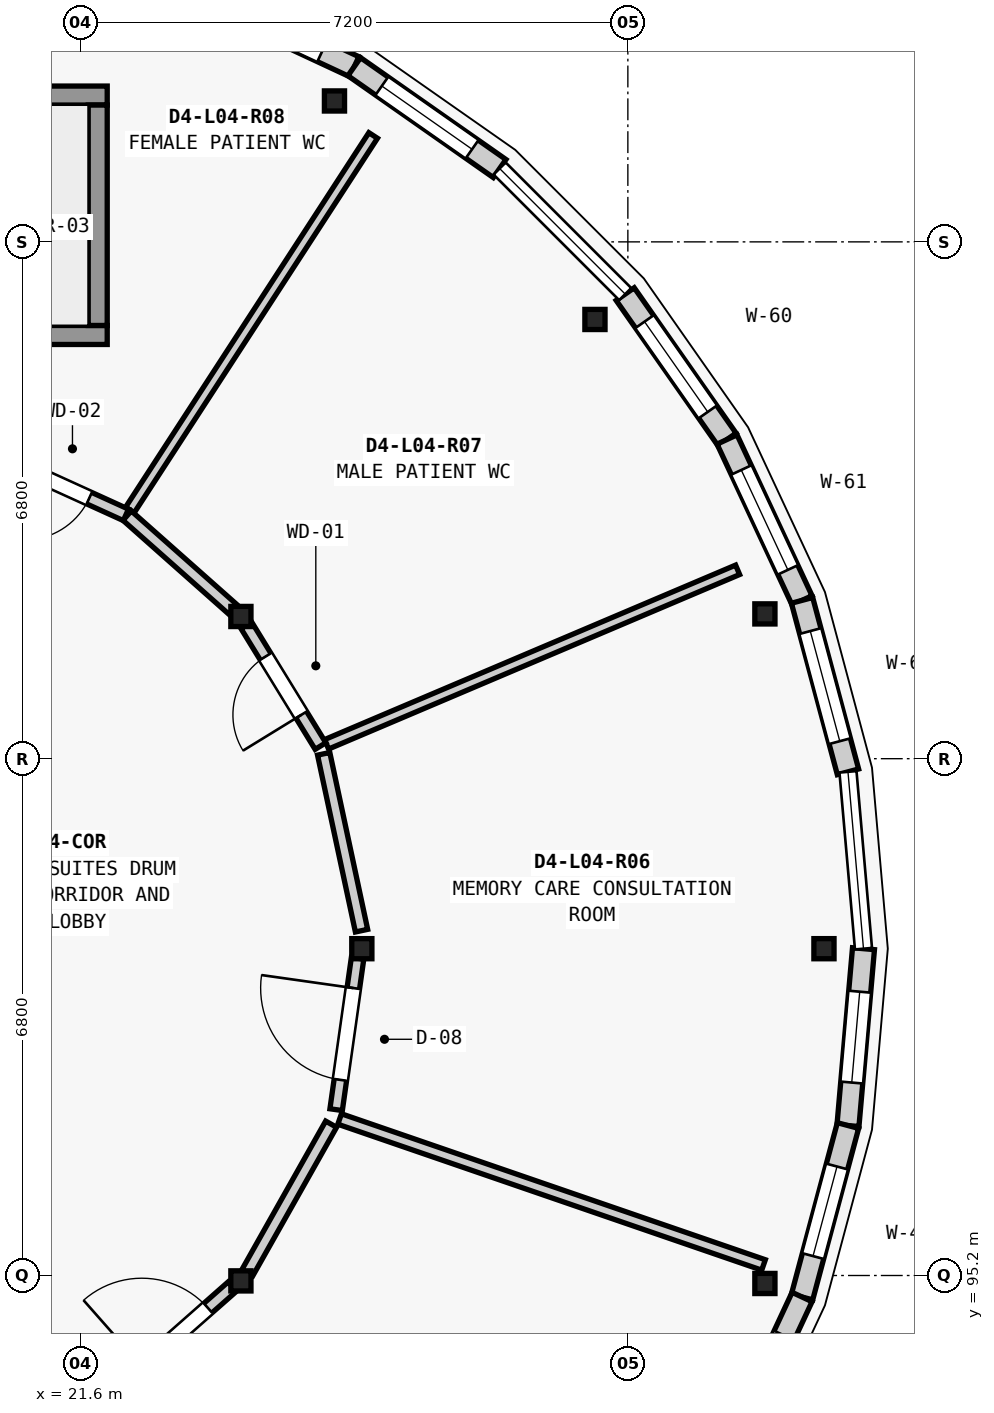
"""IFC4 building model, lengths in metres.
Left out: names, types, materials, properties, quantities, classifications, styles, units other than length and angle.
Written with IfcOpenShell. Run it as: python <this file> out.ifc"""

import sys

from ifc_helpers import new_model, si_unit, direction, frame, frame_2d, origin, origin_2d, place, context, subcontext, project, spatial, rectangle, extrude, element, fill, save


model = new_model("IFC4")
c1 = context("Model", 3, precision=1e-05, world=origin(), true_north=direction((0.0, 1.0)))
c2 = subcontext(c1, "Body", "Model", "MODEL_VIEW")
j1 = project(units=[si_unit("LENGTHUNIT", "METRE"), si_unit("PLANEANGLEUNIT", "RADIAN")], contexts=[c1])
p1 = place(None, origin())
s1 = spatial("IfcSite", under=j1, at=p1, CompositionType="ELEMENT")
p2 = place(p1, origin())
s2 = spatial("IfcBuilding", under=s1, at=p2, CompositionType="ELEMENT")
p3 = place(p2, frame((0.0, 0.0, 17.15)))
s3 = spatial("IfcBuildingStorey", under=s2, at=p3, CompositionType="ELEMENT", Elevation=17.15)
for number, where, z_axis, x_axis in (
    (1, (31.38, 99.5, 0.0), (0.0, 0.0, 1.0), (1.0, 0.0, 0.0)),
    (2, (30.603, 103.905, 0.0), (0.0, 0.0, 1.0), (1.0, 0.0, 0.0)),
    (3, (28.367, 107.779, 0.0), (0.0, 0.0, 1.0), (1.0, 0.0, 0.0)),
    (4, (24.94, 110.654, 0.0), (0.0, 0.0, 1.0), (1.0, 0.0, 0.0)),
    (5, (30.603, 95.095, 0.0), (0.0, 0.0, 1.0), (1.0, 0.0, 0.0)),
    (6, (25.3, 99.5, 0.0), (0.0, 0.0, 1.0), (1.0, 0.0, 0.0)),
    (7, (23.709, 103.871, 0.0), (0.0, 0.0, 1.0), (1.0, 0.0, 0.0)),
    (8, (23.709, 95.129, 0.0), (0.0, 0.0, 1.0), (1.0, 0.0, 0.0)),
):
    element("IfcColumn", number, at=place(p3, frame(where, z_axis=z_axis, x_axis=x_axis)), inside=s3, PredefinedType="COLUMN", context=c2, shape_type="SweptSolid", body=[
        extrude(rectangle(XDim=0.265, YDim=0.265, at=origin_2d()), origin(), (0.0, 0.0, 1.0), 4.2),
    ])
p4 = place(p3, frame((31.9, 99.5, 0.0), z_axis=(0.0, 0.0, 1.0), x_axis=(-0.087274565792, -0.996184295282, 0.0)))
e9 = element("IfcWall", 9, at=p4, inside=s3, PredefinedType="ELEMENTEDWALL", context=c2, shape_type="SweptSolid", body=[
    extrude(rectangle(XDim=2.336, YDim=0.29, at=frame_2d((1.168, 0.0))), origin(), (0.0, 0.0, 1.0), 3.369),
])
p5 = place(p4, frame((0.568, 0.0, 0.85)))
e10 = element("IfcOpeningElement", 10, at=p5, cuts=e9, PredefinedType="OPENING", context=c2, shape_type="SweptSolid", body=[
    extrude(rectangle(XDim=1.2, YDim=2.25, at=frame_2d((0.6, 1.125))), frame((0.0, 0.155, 0.0), z_axis=(0.0, -1.0, 0.0), x_axis=(1.0, 0.0, 0.0)), (0.0, 0.0, 1.0), 0.31),
])
p6 = place(p3, frame((31.696, 97.173, 0.0), z_axis=(0.0, 0.0, 1.0), x_axis=(-0.258612423585, -0.965981166673, 0.0)))
e11 = element("IfcWall", 11, at=p6, inside=s3, PredefinedType="ELEMENTEDWALL", context=c2, shape_type="SweptSolid", body=[
    extrude(rectangle(XDim=2.335, YDim=0.29, at=frame_2d((1.168, 0.0))), origin(), (0.0, 0.0, 1.0), 3.369),
])
p7 = place(p6, frame((0.558, 0.0, 0.85)))
e12 = element("IfcOpeningElement", 12, at=p7, cuts=e11, PredefinedType="OPENING", context=c2, shape_type="SweptSolid", body=[
    extrude(rectangle(XDim=1.22, YDim=1.5, at=frame_2d((0.61, 0.75))), frame((0.0, 0.155, 0.0), z_axis=(0.0, -1.0, 0.0), x_axis=(1.0, 0.0, 0.0)), (0.0, 0.0, 1.0), 0.31),
])
p8 = place(p3, frame((31.092, 94.917, 0.0), z_axis=(0.0, 0.0, 1.0), x_axis=(-0.422587894318, -0.906321946979, 0.0)))
e13 = element("IfcWall", 13, at=p8, inside=s3, PredefinedType="ELEMENTEDWALL", context=c2, shape_type="SweptSolid", body=[
    extrude(rectangle(XDim=2.336, YDim=0.29, at=frame_2d((1.168, 0.0))), origin(), (0.0, 0.0, 1.0), 3.369),
])
p9 = place(p8, frame((0.558, 0.0, 0.85)))
e14 = element("IfcOpeningElement", 14, at=p9, cuts=e13, PredefinedType="OPENING", context=c2, shape_type="SweptSolid", body=[
    extrude(rectangle(XDim=1.22, YDim=1.8, at=frame_2d((0.61, 0.9))), frame((0.0, 0.155, 0.0), z_axis=(0.0, -1.0, 0.0), x_axis=(1.0, 0.0, 0.0)), (0.0, 0.0, 1.0), 0.31),
])
p10 = place(p3, frame((23.083, 112.092, 0.0), z_axis=(0.0, 0.0, 1.0), x_axis=(0.906321946979, -0.422587894318, 0.0)))
e15 = element("IfcWall", 15, at=p10, inside=s3, PredefinedType="ELEMENTEDWALL", context=c2, shape_type="SweptSolid", body=[
    extrude(rectangle(XDim=2.336, YDim=0.29, at=frame_2d((1.168, 0.0))), origin(), (0.0, 0.0, 1.0), 3.369),
])
p11 = place(p10, frame((0.468, 0.0, 0.85)))
e16 = element("IfcOpeningElement", 16, at=p11, cuts=e15, PredefinedType="OPENING", context=c2, shape_type="SweptSolid", body=[
    extrude(rectangle(XDim=1.4, YDim=2.2, at=frame_2d((0.7, 1.1))), frame((0.0, 0.155, 0.0), z_axis=(0.0, -1.0, 0.0), x_axis=(1.0, 0.0, 0.0)), (0.0, 0.0, 1.0), 0.31),
])
p12 = place(p3, frame((25.2, 111.105, 0.0), z_axis=(0.0, 0.0, 1.0), x_axis=(0.819045278347, -0.573728883722, 0.0)))
e17 = element("IfcWall", 17, at=p12, inside=s3, PredefinedType="ELEMENTEDWALL", context=c2, shape_type="SweptSolid", body=[
    extrude(rectangle(XDim=2.336, YDim=0.29, at=frame_2d((1.168, 0.0))), origin(), (0.0, 0.0, 1.0), 3.369),
])
p13 = place(p12, frame((0.443, 0.0, 0.85)))
e18 = element("IfcOpeningElement", 18, at=p13, cuts=e17, PredefinedType="OPENING", context=c2, shape_type="SweptSolid", body=[
    extrude(rectangle(XDim=1.45, YDim=1.45, at=frame_2d((0.725, 0.725))), frame((0.0, 0.155, 0.0), z_axis=(0.0, -1.0, 0.0), x_axis=(1.0, 0.0, 0.0)), (0.0, 0.0, 1.0), 0.31),
])
p14 = place(p3, frame((28.765, 108.113, 0.0), z_axis=(0.0, 0.0, 1.0), x_axis=(0.573728883722, -0.819045278347, 0.0)))
e19 = element("IfcWall", 19, at=p14, inside=s3, PredefinedType="ELEMENTEDWALL", context=c2, shape_type="SweptSolid", body=[
    extrude(rectangle(XDim=2.336, YDim=0.29, at=frame_2d((1.168, 0.0))), origin(), (0.0, 0.0, 1.0), 3.369),
])
p15 = place(p14, frame((0.443, 0.0, 0.85)))
e20 = element("IfcOpeningElement", 20, at=p15, cuts=e19, PredefinedType="OPENING", context=c2, shape_type="SweptSolid", body=[
    extrude(rectangle(XDim=1.45, YDim=1.75, at=frame_2d((0.725, 0.875))), frame((0.0, 0.155, 0.0), z_axis=(0.0, -1.0, 0.0), x_axis=(1.0, 0.0, 0.0)), (0.0, 0.0, 1.0), 0.31),
])
p16 = place(p3, frame((30.105, 106.2, 0.0), z_axis=(0.0, 0.0, 1.0), x_axis=(0.422587894318, -0.906321946979, 0.0)))
e21 = element("IfcWall", 21, at=p16, inside=s3, PredefinedType="ELEMENTEDWALL", context=c2, shape_type="SweptSolid", body=[
    extrude(rectangle(XDim=2.336, YDim=0.29, at=frame_2d((1.168, 0.0))), origin(), (0.0, 0.0, 1.0), 3.369),
])
p17 = place(p16, frame((0.443, 0.0, 0.85)))
e22 = element("IfcOpeningElement", 22, at=p17, cuts=e21, PredefinedType="OPENING", context=c2, shape_type="SweptSolid", body=[
    extrude(rectangle(XDim=1.45, YDim=2.05, at=frame_2d((0.725, 1.025))), frame((0.0, 0.155, 0.0), z_axis=(0.0, -1.0, 0.0), x_axis=(1.0, 0.0, 0.0)), (0.0, 0.0, 1.0), 0.31),
])
p18 = place(p3, frame((31.092, 104.083, 0.0), z_axis=(0.0, 0.0, 1.0), x_axis=(0.258612423585, -0.965981166673, 0.0)))
e23 = element("IfcWall", 23, at=p18, inside=s3, PredefinedType="ELEMENTEDWALL", context=c2, shape_type="SweptSolid", body=[
    extrude(rectangle(XDim=2.335, YDim=0.29, at=frame_2d((1.168, 0.0))), origin(), (0.0, 0.0, 1.0), 3.369),
])
p19 = place(p18, frame((0.418, 0.0, 0.85)))
e24 = element("IfcOpeningElement", 24, at=p19, cuts=e23, PredefinedType="OPENING", context=c2, shape_type="SweptSolid", body=[
    extrude(rectangle(XDim=1.5, YDim=1.3, at=frame_2d((0.75, 0.65))), frame((0.0, 0.155, 0.0), z_axis=(0.0, -1.0, 0.0), x_axis=(1.0, 0.0, 0.0)), (0.0, 0.0, 1.0), 0.31),
])
p20 = place(p3, frame((15.05, 107.575, 0.0), z_axis=(0.0, 0.0, 1.0), x_axis=(1.0, 0.0, 0.0)))
e25 = element("IfcWall", 25, at=p20, inside=s3, PredefinedType="SHEAR", context=c2, shape_type="SweptSolid", body=[
    extrude(rectangle(XDim=6.9, YDim=0.25, at=frame_2d((3.45, 0.0))), origin(), (0.0, 0.0, 1.0), 4.015),
])
p21 = place(p20, frame((0.43, 0.0, 0.0)))
e26 = element("IfcOpeningElement", 26, at=p21, cuts=e25, PredefinedType="OPENING", context=c2, shape_type="SweptSolid", body=[
    extrude(rectangle(XDim=1.1, YDim=2.15, at=frame_2d((0.55, 1.075))), frame((0.0, 0.135, 0.0), z_axis=(0.0, -1.0, 0.0), x_axis=(1.0, 0.0, 0.0)), (0.0, 0.0, 1.0), 0.27),
])
p22 = place(p3, frame((15.05, 110.725, 0.0), z_axis=(0.0, 0.0, 1.0), x_axis=(1.0, 0.0, 0.0)))
e27 = element("IfcWall", 27, at=p22, inside=s3, PredefinedType="SHEAR", context=c2, shape_type="SweptSolid", body=[
    extrude(rectangle(XDim=6.9, YDim=0.25, at=frame_2d((3.45, 0.0))), origin(), (0.0, 0.0, 1.0), 4.015),
])
p23 = place(p3, frame((21.825, 107.7, 0.0), z_axis=(0.0, 0.0, 1.0), x_axis=(0.0, 1.0, 0.0)))
e28 = element("IfcWall", 28, at=p23, inside=s3, PredefinedType="SHEAR", context=c2, shape_type="SweptSolid", body=[
    extrude(rectangle(XDim=2.9, YDim=0.25, at=frame_2d((1.45, 0.0))), origin(), (0.0, 0.0, 1.0), 4.015),
])
p24 = place(p3, frame((25.008, 97.259, 0.0), z_axis=(0.0, 0.0, 1.0), x_axis=(0.945537377012, -0.325513546068, 0.0)))
e29 = element("IfcWall", 29, at=p24, inside=s3, PredefinedType="PARTITIONING", context=c2, shape_type="SweptSolid", body=[
    extrude(rectangle(XDim=5.898, YDim=0.145, at=frame_2d((2.949, 0.0))), origin(), (0.0, 0.0, 1.0), 3.344),
])
p25 = place(p3, frame((24.836, 102.189, 0.0), z_axis=(0.0, 0.0, 1.0), x_axis=(0.920468107404, 0.390817685438, 0.0)))
e30 = element("IfcWall", 30, at=p25, inside=s3, PredefinedType="PLUMBINGWALL", context=c2, shape_type="SweptSolid", body=[
    extrude(rectangle(XDim=5.875, YDim=0.135, at=frame_2d((2.938, 0.0))), origin(), (0.0, 0.0, 1.0), 3.344),
])
p26 = place(p3, frame((22.249, 105.273, 0.0), z_axis=(0.0, 0.0, 1.0), x_axis=(0.544677189284, 0.838645789039, 0.0)))
e31 = element("IfcWall", 31, at=p26, inside=s3, PredefinedType="PLUMBINGWALL", context=c2, shape_type="SweptSolid", body=[
    extrude(rectangle(XDim=5.875, YDim=0.135, at=frame_2d((2.938, 0.0))), origin(), (0.0, 0.0, 1.0), 3.344),
])
p27 = place(p3, frame((22.088, 93.724, 0.0), z_axis=(0.0, 0.0, 1.0), x_axis=(0.750064751016, 0.66136439977, 0.0)))
e32 = element("IfcWall", 32, at=p27, inside=s3, PredefinedType="PARTITIONING", context=c2, shape_type="SweptSolid", body=[
    extrude(rectangle(XDim=2.009, YDim=0.165, at=frame_2d((1.005, 0.0))), origin(), (0.0, 0.0, 1.0), 3.344),
])
p28 = place(p27, frame((0.424, 0.0, 0.0)))
e33 = element("IfcOpeningElement", 33, at=p28, cuts=e32, PredefinedType="OPENING", context=c2, shape_type="SweptSolid", body=[
    extrude(rectangle(XDim=1.16, YDim=2.18, at=frame_2d((0.58, 1.09))), frame((0.0, 0.093, 0.0), z_axis=(0.0, -1.0, 0.0), x_axis=(1.0, 0.0, 0.0)), (0.0, 0.0, 1.0), 0.185),
])
p29 = place(p3, frame((23.794, 95.237, 0.0), z_axis=(0.0, 0.0, 1.0), x_axis=(0.491278846753, 0.87100235059, 0.0)))
e34 = element("IfcWall", 34, at=p29, inside=s3, PredefinedType="PARTITIONING", context=c2, shape_type="SweptSolid", body=[
    extrude(rectangle(XDim=2.243, YDim=0.165, at=frame_2d((1.122, 0.0))), origin(), (0.0, 0.0, 1.0), 3.344),
])
p30 = place(p3, frame((24.962, 97.382, 0.0), z_axis=(0.0, 0.0, 1.0), x_axis=(0.140164013462, 0.990128299429, 0.0)))
e35 = element("IfcWall", 35, at=p30, inside=s3, PredefinedType="PARTITIONING", context=c2, shape_type="SweptSolid", body=[
    extrude(rectangle(XDim=2.012, YDim=0.165, at=frame_2d((1.006, 0.0))), origin(), (0.0, 0.0, 1.0), 3.344),
])
p31 = place(p30, frame((0.396, 0.0, 0.0)))
e36 = element("IfcOpeningElement", 36, at=p31, cuts=e35, PredefinedType="OPENING", context=c2, shape_type="SweptSolid", body=[
    extrude(rectangle(XDim=1.22, YDim=2.18, at=frame_2d((0.61, 1.09))), frame((0.0, 0.093, 0.0), z_axis=(0.0, -1.0, 0.0), x_axis=(1.0, 0.0, 0.0)), (0.0, 0.0, 1.0), 0.185),
])
p32 = place(p3, frame((25.296, 99.737, 0.0), z_axis=(0.0, 0.0, 1.0), x_axis=(-0.209199758456, 0.977872926848, 0.0)))
e37 = element("IfcWall", 37, at=p32, inside=s3, PredefinedType="PARTITIONING", context=c2, shape_type="SweptSolid", body=[
    extrude(rectangle(XDim=2.38, YDim=0.165, at=frame_2d((1.19, 0.0))), origin(), (0.0, 0.0, 1.0), 3.344),
])
p33 = place(p3, frame((24.756, 102.166, 0.0), z_axis=(0.0, 0.0, 1.0), x_axis=(-0.523293079125, 0.852152775821, 0.0)))
e38 = element("IfcWall", 38, at=p33, inside=s3, PredefinedType="PARTITIONING", context=c2, shape_type="SweptSolid", body=[
    extrude(rectangle(XDim=1.863, YDim=0.165, at=frame_2d((0.932, 0.0))), origin(), (0.0, 0.0, 1.0), 3.344),
])
p34 = place(p33, frame((0.482, 0.0, 0.0)))
e39 = element("IfcOpeningElement", 39, at=p34, cuts=e38, PredefinedType="OPENING", context=c2, shape_type="SweptSolid", body=[
    extrude(rectangle(XDim=0.9, YDim=2.1, at=frame_2d((0.45, 1.05))), frame((0.0, 0.093, 0.0), z_axis=(0.0, -1.0, 0.0), x_axis=(1.0, 0.0, 0.0)), (0.0, 0.0, 1.0), 0.185),
])
p35 = place(p3, frame((23.606, 103.962, 0.0), z_axis=(0.0, 0.0, 1.0), x_axis=(-0.748225706364, 0.66344426468, 0.0)))
e40 = element("IfcWall", 40, at=p35, inside=s3, PredefinedType="PARTITIONING", context=c2, shape_type="SweptSolid", body=[
    extrude(rectangle(XDim=1.863, YDim=0.165, at=frame_2d((0.932, 0.0))), origin(), (0.0, 0.0, 1.0), 3.344),
])
p36 = place(p3, frame((22.196, 105.208, 0.0), z_axis=(0.0, 0.0, 1.0), x_axis=(-0.910195152859, 0.414179651495, 0.0)))
e41 = element("IfcWall", 41, at=p36, inside=s3, PredefinedType="PARTITIONING", context=c2, shape_type="SweptSolid", body=[
    extrude(rectangle(XDim=2.002, YDim=0.165, at=frame_2d((1.001, 0.0))), origin(), (0.0, 0.0, 1.0), 3.344),
])
p37 = place(p36, frame((0.53, 0.0, 0.0)))
e42 = element("IfcOpeningElement", 42, at=p37, cuts=e41, PredefinedType="OPENING", context=c2, shape_type="SweptSolid", body=[
    extrude(rectangle(XDim=0.94, YDim=2.1, at=frame_2d((0.47, 1.05))), frame((0.0, 0.093, 0.0), z_axis=(0.0, -1.0, 0.0), x_axis=(1.0, 0.0, 0.0)), (0.0, 0.0, 1.0), 0.185),
])
p38 = place(p5, origin())
e43 = element("IfcWindow", 43, at=p38, inside=s3, PartitioningType="SINGLE_PANEL", PredefinedType="WINDOW", context=c2, shape_type="SweptSolid", body=[
    extrude(rectangle(XDim=1.2, YDim=2.25, at=frame_2d((0.6, 1.125))), frame((0.0, 0.03, 0.0), z_axis=(0.0, -1.0, 0.0), x_axis=(1.0, 0.0, 0.0)), (0.0, 0.0, 1.0), 0.06),
])
fill(e10, e43)
p39 = place(p7, origin())
e44 = element("IfcWindow", 44, at=p39, inside=s3, PartitioningType="SINGLE_PANEL", PredefinedType="WINDOW", context=c2, shape_type="SweptSolid", body=[
    extrude(rectangle(XDim=1.22, YDim=1.5, at=frame_2d((0.61, 0.75))), frame((0.0, 0.03, 0.0), z_axis=(0.0, -1.0, 0.0), x_axis=(1.0, 0.0, 0.0)), (0.0, 0.0, 1.0), 0.06),
])
fill(e12, e44)
p40 = place(p11, origin())
e45 = element("IfcWindow", 45, at=p40, inside=s3, PartitioningType="SINGLE_PANEL", PredefinedType="WINDOW", context=c2, shape_type="SweptSolid", body=[
    extrude(rectangle(XDim=1.4, YDim=2.2, at=frame_2d((0.7, 1.1))), frame((0.0, 0.03, 0.0), z_axis=(0.0, -1.0, 0.0), x_axis=(1.0, 0.0, 0.0)), (0.0, 0.0, 1.0), 0.06),
])
fill(e16, e45)
p41 = place(p13, origin())
e46 = element("IfcWindow", 46, at=p41, inside=s3, PartitioningType="SINGLE_PANEL", PredefinedType="WINDOW", context=c2, shape_type="SweptSolid", body=[
    extrude(rectangle(XDim=1.45, YDim=1.45, at=frame_2d((0.725, 0.725))), frame((0.0, 0.03, 0.0), z_axis=(0.0, -1.0, 0.0), x_axis=(1.0, 0.0, 0.0)), (0.0, 0.0, 1.0), 0.06),
])
fill(e18, e46)
p42 = place(p15, origin())
e47 = element("IfcWindow", 47, at=p42, inside=s3, PartitioningType="SINGLE_PANEL", PredefinedType="WINDOW", context=c2, shape_type="SweptSolid", body=[
    extrude(rectangle(XDim=1.45, YDim=1.75, at=frame_2d((0.725, 0.875))), frame((0.0, 0.03, 0.0), z_axis=(0.0, -1.0, 0.0), x_axis=(1.0, 0.0, 0.0)), (0.0, 0.0, 1.0), 0.06),
])
fill(e20, e47)
p43 = place(p17, origin())
e48 = element("IfcWindow", 48, at=p43, inside=s3, PartitioningType="SINGLE_PANEL", PredefinedType="WINDOW", context=c2, shape_type="SweptSolid", body=[
    extrude(rectangle(XDim=1.45, YDim=2.05, at=frame_2d((0.725, 1.025))), frame((0.0, 0.03, 0.0), z_axis=(0.0, -1.0, 0.0), x_axis=(1.0, 0.0, 0.0)), (0.0, 0.0, 1.0), 0.06),
])
fill(e22, e48)
p44 = place(p19, origin())
e49 = element("IfcWindow", 49, at=p44, inside=s3, PartitioningType="SINGLE_PANEL", PredefinedType="WINDOW", context=c2, shape_type="SweptSolid", body=[
    extrude(rectangle(XDim=1.5, YDim=1.3, at=frame_2d((0.75, 0.65))), frame((0.0, 0.03, 0.0), z_axis=(0.0, -1.0, 0.0), x_axis=(1.0, 0.0, 0.0)), (0.0, 0.0, 1.0), 0.06),
])
fill(e24, e49)
p45 = place(p28, origin())
e50 = element("IfcDoor", 50, at=p45, inside=s3, OperationType="SINGLE_SWING_LEFT", PredefinedType="DOOR", context=c2, shape_type="SweptSolid", body=[
    extrude(rectangle(XDim=1.16, YDim=2.18, at=frame_2d((0.58, 1.09))), frame((0.0, 0.025, 0.0), z_axis=(0.0, -1.0, 0.0), x_axis=(1.0, 0.0, 0.0)), (0.0, 0.0, 1.0), 0.05),
])
fill(e33, e50)
p46 = place(p31, origin())
e51 = element("IfcDoor", 51, at=p46, inside=s3, OperationType="SINGLE_SWING_RIGHT", PredefinedType="DOOR", context=c2, shape_type="SweptSolid", body=[
    extrude(rectangle(XDim=1.22, YDim=2.18, at=frame_2d((0.61, 1.09))), frame((0.0, 0.025, 0.0), z_axis=(0.0, -1.0, 0.0), x_axis=(1.0, 0.0, 0.0)), (0.0, 0.0, 1.0), 0.05),
])
fill(e36, e51)
p47 = place(p34, origin())
e52 = element("IfcDoor", 52, at=p47, inside=s3, OperationType="SINGLE_SWING_LEFT", PredefinedType="DOOR", context=c2, shape_type="SweptSolid", body=[
    extrude(rectangle(XDim=0.9, YDim=2.1, at=frame_2d((0.45, 1.05))), frame((0.0, 0.025, 0.0), z_axis=(0.0, -1.0, 0.0), x_axis=(1.0, 0.0, 0.0)), (0.0, 0.0, 1.0), 0.05),
])
fill(e39, e52)
p48 = place(p37, origin())
e53 = element("IfcDoor", 53, at=p48, inside=s3, OperationType="SINGLE_SWING_RIGHT", PredefinedType="DOOR", context=c2, shape_type="SweptSolid", body=[
    extrude(rectangle(XDim=0.94, YDim=2.1, at=frame_2d((0.47, 1.05))), frame((0.0, 0.025, 0.0), z_axis=(0.0, -1.0, 0.0), x_axis=(1.0, 0.0, 0.0)), (0.0, 0.0, 1.0), 0.05),
])
fill(e42, e53)
save(model, sys.argv[1])
